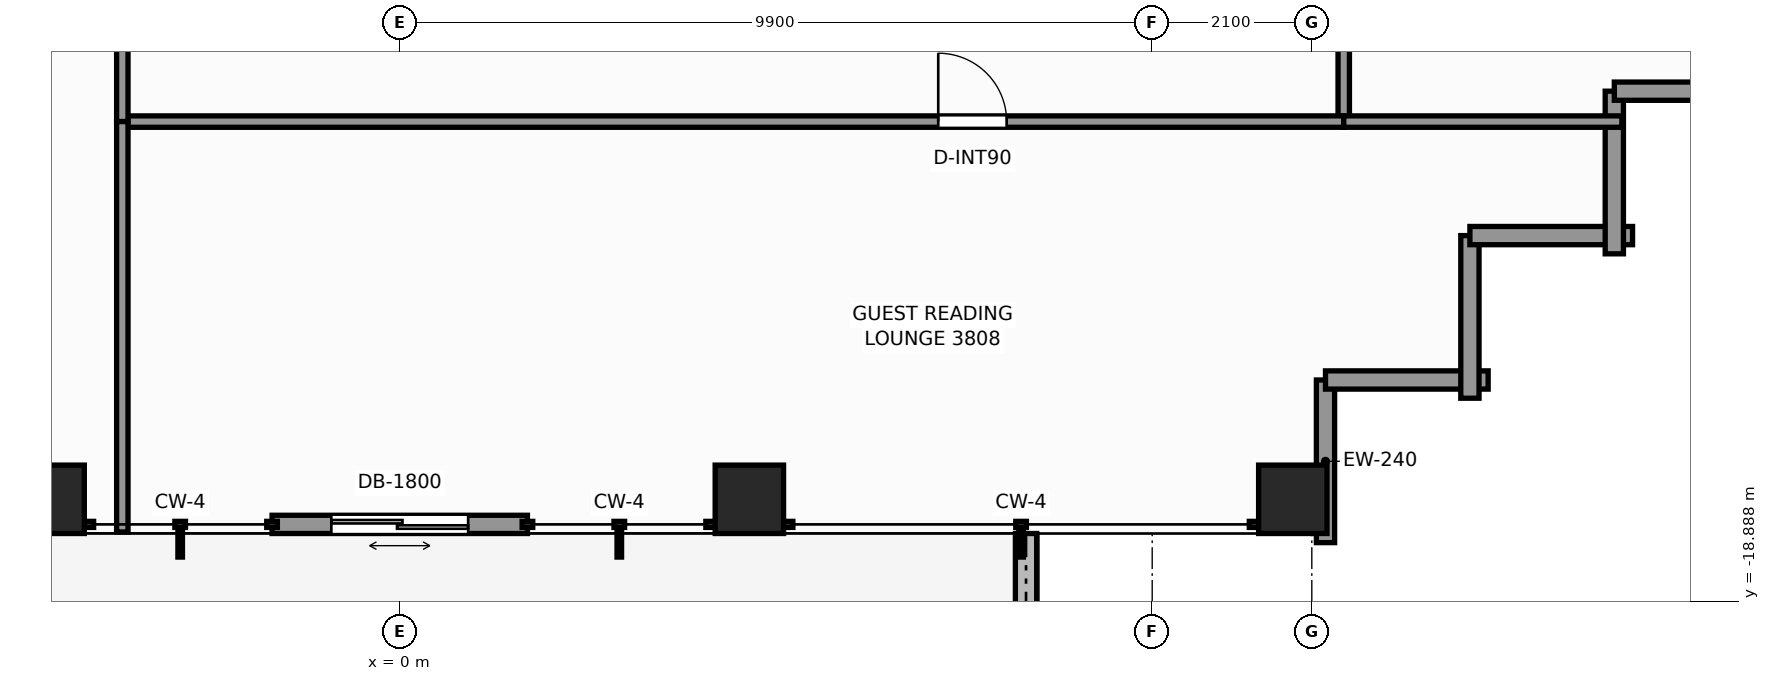
"""IFC4 building model, lengths in metres.
Left out: names, types, materials, properties, quantities, classifications, styles, units other than length and angle.
Written with IfcOpenShell. Run it as: python <this file> out.ifc"""

import sys

from ifc_helpers import new_model, si_unit, direction, frame, frame_2d, origin, origin_2d, place, context, subcontext, project, spatial, rectangle, extrude, element, fill, save


model = new_model("IFC4")
c1 = context("Model", 3, precision=1e-05, world=origin(), true_north=direction((0.0, 1.0)))
c2 = subcontext(c1, "Body", "Model", "MODEL_VIEW")
j1 = project(units=[si_unit("LENGTHUNIT", "METRE"), si_unit("PLANEANGLEUNIT", "RADIAN")], contexts=[c1])
p1 = place(None, origin())
s1 = spatial("IfcSite", under=j1, at=p1, CompositionType="ELEMENT")
p2 = place(p1, origin())
s2 = spatial("IfcBuilding", under=s1, at=p2, CompositionType="ELEMENT")
p3 = place(p2, frame((0.0, 0.0, 131.6)))
s3 = spatial("IfcBuildingStorey", under=s2, at=p3, CompositionType="ELEMENT", Elevation=131.6)
for number, where, z_axis, x_axis in (
    (1, (-4.6, -17.55, 0.0), (0.0, 0.0, 1.0), (1.0, 0.0, 0.0)),
    (2, (4.6, -17.55, 0.0), (0.0, 0.0, 1.0), (1.0, 0.0, 0.0)),
    (3, (11.75, -17.55, 0.0), (0.0, 0.0, 1.0), (1.0, 0.0, 0.0)),
):
    element("IfcColumn", number, at=place(p3, frame(where, z_axis=z_axis, x_axis=x_axis)), inside=s3, PredefinedType="COLUMN", context=c2, shape_type="SweptSolid", body=[
        extrude(rectangle(XDim=0.9, YDim=0.9, at=origin_2d()), origin(), (0.0, 0.0, 1.0), 3.3),
    ])
p4 = place(p3, frame((8.24, -19.466, -0.02), z_axis=(0.0, 0.0, 1.0), x_axis=(0.0, 1.0, 0.0)))
e4 = element("IfcWall", 4, at=p4, inside=s3, PredefinedType="PARAPET", context=c2, shape_type="SweptSolid", body=[
    extrude(rectangle(XDim=1.466, YDim=0.28, at=frame_2d((0.733, 0.0))), origin(), (0.0, 0.0, 1.0), 0.42),
])
p5 = place(p3, frame((1.68, -17.88, 0.0), z_axis=(0.0, 0.0, 1.0), x_axis=(-1.0, 0.0, 0.0)))
e5 = element("IfcWall", 5, at=p5, inside=s3, PredefinedType="STANDARD", context=c2, shape_type="SweptSolid", body=[
    extrude(rectangle(XDim=3.36, YDim=0.24, at=frame_2d((1.68, 0.0))), origin(), (0.0, 0.0, 1.0), 3.1),
])
p6 = place(p5, frame((0.78, 0.0, 0.0)))
e6 = element("IfcOpeningElement", 6, at=p6, cuts=e5, PredefinedType="OPENING", context=c2, shape_type="SweptSolid", body=[
    extrude(rectangle(XDim=1.8, YDim=2.2, at=frame_2d((0.9, 1.1))), frame((0.0, 0.13, 0.0), z_axis=(0.0, -1.0, 0.0), x_axis=(1.0, 0.0, 0.0)), (0.0, 0.0, 1.0), 0.26),
])
for number, where, z_axis, x_axis in (
    (7, (12.18, -15.98, 0.0), (0.0, 0.0, 1.0), (0.0, -1.0, 0.0)),
    (8, (14.32, -15.98, 0.0), (0.0, 0.0, 1.0), (-1.0, 0.0, 0.0)),
):
    element("IfcWall", number, at=place(p3, frame(where, z_axis=z_axis, x_axis=x_axis)), inside=s3, PredefinedType="STANDARD", context=c2, shape_type="SweptSolid", body=[
        extrude(rectangle(XDim=2.14, YDim=0.24, at=frame_2d((1.07, 0.0))), origin(), (0.0, 0.0, 1.0), 2.479),
    ])
for number, where, z_axis, x_axis in (
    (9, (14.08, -14.08, 0.0), (0.0, 0.0, 1.0), (0.0, -1.0, 0.0)),
    (10, (16.22, -14.08, 0.0), (0.0, 0.0, 1.0), (-1.0, 0.0, 0.0)),
):
    element("IfcWall", number, at=place(p3, frame(where, z_axis=z_axis, x_axis=x_axis)), inside=s3, PredefinedType="STANDARD", context=c2, shape_type="SweptSolid", body=[
        extrude(rectangle(XDim=2.14, YDim=0.24, at=frame_2d((1.07, 0.0))), origin(), (0.0, 0.0, 1.0), 2.479),
    ])
for number, where, z_axis, x_axis in (
    (11, (15.98, -12.18, 0.0), (0.0, 0.0, 1.0), (0.0, -1.0, 0.0)),
    (12, (18.12, -12.18, 0.0), (0.0, 0.0, 1.0), (-1.0, 0.0, 0.0)),
):
    element("IfcWall", number, at=place(p3, frame(where, z_axis=z_axis, x_axis=x_axis)), inside=s3, PredefinedType="STANDARD", context=c2, shape_type="SweptSolid", body=[
        extrude(rectangle(XDim=2.14, YDim=0.24, at=frame_2d((1.07, 0.0))), origin(), (0.0, 0.0, 1.0), 2.479),
    ])
p7 = place(p3, frame((12.42, -12.58, 0.0), z_axis=(0.0, 0.0, 1.0), x_axis=(0.0, 1.0, 0.0)))
e13 = element("IfcWall", 13, at=p7, inside=s3, PredefinedType="PARTITIONING", context=c2, shape_type="SweptSolid", body=[
    extrude(rectangle(XDim=24.84, YDim=0.15, at=frame_2d((12.42, 0.0))), origin(), (0.0, 0.0, 1.0), 2.312),
])
p8 = place(p7, frame((4.595, 0.0, 0.0)))
e14 = element("IfcOpeningElement", 14, at=p8, cuts=e13, PredefinedType="OPENING", context=c2, shape_type="SweptSolid", body=[
    extrude(rectangle(XDim=0.9, YDim=2.06, at=frame_2d((0.45, 1.03))), frame((0.0, 0.085, 0.0), z_axis=(0.0, -1.0, 0.0), x_axis=(1.0, 0.0, 0.0)), (0.0, 0.0, 1.0), 0.17),
])
p9 = place(p7, frame((19.665, 0.0, 0.0)))
e15 = element("IfcOpeningElement", 15, at=p9, cuts=e13, PredefinedType="OPENING", context=c2, shape_type="SweptSolid", body=[
    extrude(rectangle(XDim=0.9, YDim=2.06, at=frame_2d((0.45, 1.03))), frame((0.0, 0.085, 0.0), z_axis=(0.0, -1.0, 0.0), x_axis=(1.0, 0.0, 0.0)), (0.0, 0.0, 1.0), 0.17),
])
p10 = place(p3, frame((-3.65, -12.58, 0.0), z_axis=(0.0, 0.0, 1.0), x_axis=(1.0, 0.0, 0.0)))
e16 = element("IfcWall", 16, at=p10, inside=s3, PredefinedType="PARTITIONING", context=c2, shape_type="SweptSolid", body=[
    extrude(rectangle(XDim=16.07, YDim=0.15, at=frame_2d((8.035, 0.0))), origin(), (0.0, 0.0, 1.0), 2.312),
])
p11 = place(p10, frame((10.735, 0.0, 0.0)))
e17 = element("IfcOpeningElement", 17, at=p11, cuts=e16, PredefinedType="OPENING", context=c2, shape_type="SweptSolid", body=[
    extrude(rectangle(XDim=0.9, YDim=2.06, at=frame_2d((0.45, 1.03))), frame((0.0, 0.085, 0.0), z_axis=(0.0, -1.0, 0.0), x_axis=(1.0, 0.0, 0.0)), (0.0, 0.0, 1.0), 0.17),
])
p12 = place(p3, frame((-3.65, -12.58, 0.0), z_axis=(0.0, 0.0, 1.0), x_axis=(0.0, 1.0, 0.0)))
e18 = element("IfcWall", 18, at=p12, inside=s3, PredefinedType="PARTITIONING", context=c2, shape_type="SweptSolid", body=[
    extrude(rectangle(XDim=2.68, YDim=0.15, at=frame_2d((1.34, 0.0))), origin(), (0.0, 0.0, 1.0), 3.1),
])
p13 = place(p3, frame((12.42, -12.58, 0.0), z_axis=(0.0, 0.0, 1.0), x_axis=(1.0, 0.0, 0.0)))
e19 = element("IfcWall", 19, at=p13, inside=s3, PredefinedType="PARTITIONING", context=c2, shape_type="SweptSolid", body=[
    extrude(rectangle(XDim=3.66, YDim=0.15, at=frame_2d((1.83, 0.0))), origin(), (0.0, 0.0, 1.0), 3.1),
])
p14 = place(p3, frame((-3.65, -17.98, 0.0), z_axis=(0.0, 0.0, 1.0), x_axis=(0.0, 1.0, 0.0)))
e20 = element("IfcWall", 20, at=p14, inside=s3, PredefinedType="PARTITIONING", context=c2, shape_type="SweptSolid", body=[
    extrude(rectangle(XDim=5.4, YDim=0.15, at=frame_2d((2.7, 0.0))), origin(), (0.0, 0.0, 1.0), 2.469),
])
p15 = place(p6, origin())
e21 = element("IfcDoor", 21, at=p15, inside=s3, OperationType="DOUBLE_DOOR_SLIDING", PredefinedType="DOOR", context=c2, shape_type="SweptSolid", body=[
    extrude(rectangle(XDim=1.8, YDim=2.2, at=frame_2d((0.9, 1.1))), frame((0.0, 0.025, 0.0), z_axis=(0.0, -1.0, 0.0), x_axis=(1.0, 0.0, 0.0)), (0.0, 0.0, 1.0), 0.05),
])
fill(e6, e21)
p16 = place(p11, origin())
e22 = element("IfcDoor", 22, at=p16, inside=s3, OperationType="SINGLE_SWING_LEFT", PredefinedType="DOOR", context=c2, shape_type="SweptSolid", body=[
    extrude(rectangle(XDim=0.9, YDim=2.06, at=frame_2d((0.45, 1.03))), frame((0.0, 0.025, 0.0), z_axis=(0.0, -1.0, 0.0), x_axis=(1.0, 0.0, 0.0)), (0.0, 0.0, 1.0), 0.05),
])
fill(e17, e22)
save(model, sys.argv[1])
